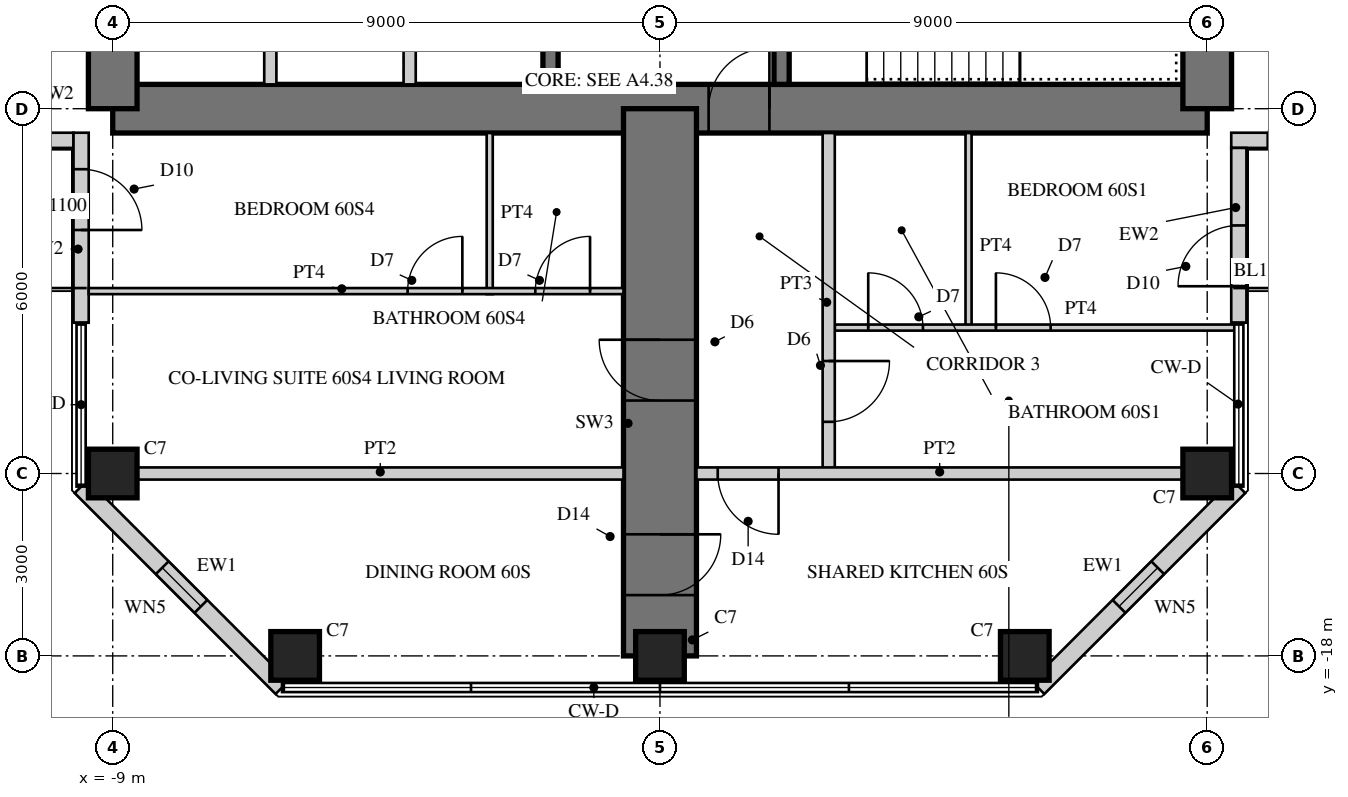
"""IFC4 building model, lengths in metres.
Left out: names, types, materials, properties, quantities, classifications, styles, units other than length and angle.
Written with IfcOpenShell. Run it as: python <this file> out.ifc"""

import sys

from ifc_helpers import new_model, si_unit, direction, frame, frame_2d, origin, origin_2d, place, context, subcontext, project, spatial, rectangle, hollow_rectangle, extrude, element, fill, save


model = new_model("IFC4")
c1 = context("Model", 3, precision=1e-05, world=origin(), true_north=direction((0.0, 1.0)))
c2 = subcontext(c1, "Body", "Model", "MODEL_VIEW")
j1 = project(units=[si_unit("LENGTHUNIT", "METRE"), si_unit("PLANEANGLEUNIT", "RADIAN")], contexts=[c1])
p1 = place(None, origin())
s1 = spatial("IfcSite", under=j1, at=p1, CompositionType="ELEMENT")
p2 = place(p1, origin())
s2 = spatial("IfcBuilding", under=s1, at=p2, CompositionType="ELEMENT")
p3 = place(p2, frame((0.0, 0.0, 235.7)))
s3 = spatial("IfcBuildingStorey", under=s2, at=p3, CompositionType="ELEMENT", Elevation=235.7)
p4 = place(p3, frame((-9.0, -9.0, 0.0), z_axis=(0.0, 0.0, 1.0), x_axis=(1.0, 0.0, 0.0)))
e1 = element("IfcWall", 1, at=p4, inside=s3, PredefinedType="SHEAR", context=c2, shape_type="SweptSolid", body=[
    extrude(rectangle(XDim=18.0, YDim=0.8, at=frame_2d((9.0, 0.0))), origin(), (0.0, 0.0, 1.0), 3.4),
])
p5 = place(p4, frame((9.8, 0.0, 0.0)))
e2 = element("IfcOpeningElement", 2, at=p5, cuts=e1, PredefinedType="OPENING", context=c2, shape_type="SweptSolid", body=[
    extrude(rectangle(XDim=1.0, YDim=2.4, at=frame_2d((0.5, 1.2))), frame((0.0, 0.41, 0.0), z_axis=(0.0, -1.0, 0.0), x_axis=(1.0, 0.0, 0.0)), (0.0, 0.0, 1.0), 0.82),
])
p6 = place(p3, frame((9.0, -9.0, 0.0), z_axis=(0.0, 0.0, 1.0), x_axis=(0.0, 1.0, 0.0)))
e3 = element("IfcWall", 3, at=p6, inside=s3, PredefinedType="SHEAR", context=c2, shape_type="SweptSolid", body=[
    extrude(rectangle(XDim=18.0, YDim=0.8, at=frame_2d((9.0, 0.0))), origin(), (0.0, 0.0, 1.0), 3.4),
])
p7 = place(p6, frame((9.8, 0.0, 0.0)))
e4 = element("IfcOpeningElement", 4, at=p7, cuts=e3, PredefinedType="OPENING", context=c2, shape_type="SweptSolid", body=[
    extrude(rectangle(XDim=1.0, YDim=2.4, at=frame_2d((0.5, 1.2))), frame((0.0, 0.41, 0.0), z_axis=(0.0, -1.0, 0.0), x_axis=(1.0, 0.0, 0.0)), (0.0, 0.0, 1.0), 0.82),
])
p8 = place(p3, frame((-9.0, 9.0, 0.0), z_axis=(0.0, 0.0, 1.0), x_axis=(0.0, -1.0, 0.0)))
e5 = element("IfcWall", 5, at=p8, inside=s3, PredefinedType="SHEAR", context=c2, shape_type="SweptSolid", body=[
    extrude(rectangle(XDim=18.0, YDim=0.8, at=frame_2d((9.0, 0.0))), origin(), (0.0, 0.0, 1.0), 3.4),
])
p9 = place(p8, frame((9.8, 0.0, 0.0)))
e6 = element("IfcOpeningElement", 6, at=p9, cuts=e5, PredefinedType="OPENING", context=c2, shape_type="SweptSolid", body=[
    extrude(rectangle(XDim=1.0, YDim=2.4, at=frame_2d((0.5, 1.2))), frame((0.0, 0.41, 0.0), z_axis=(0.0, -1.0, 0.0), x_axis=(1.0, 0.0, 0.0)), (0.0, 0.0, 1.0), 0.82),
])
p10 = place(p3, frame((-1.8, -1.875, 0.0), z_axis=(0.0, 0.0, 1.0), x_axis=(0.0, -1.0, 0.0)))
e7 = element("IfcWall", 7, at=p10, inside=s3, PredefinedType="SHEAR", context=c2, shape_type="SweptSolid", body=[
    extrude(rectangle(XDim=6.725, YDim=0.25, at=frame_2d((3.363, 0.0))), origin(), (0.0, 0.0, 1.0), 3.4),
])
p11 = place(p10, frame((1.875, 0.0, 0.0)))
e8 = element("IfcOpeningElement", 8, at=p11, cuts=e7, PredefinedType="OPENING", context=c2, shape_type="SweptSolid", body=[
    extrude(rectangle(XDim=1.6, YDim=2.4, at=frame_2d((0.8, 1.2))), frame((0.0, 0.135, 0.0), z_axis=(0.0, -1.0, 0.0), x_axis=(1.0, 0.0, 0.0)), (0.0, 0.0, 1.0), 0.27),
])
for number, where, z_axis, x_axis in (
    (9, (-4.117, -5.975, 0.0), (0.0, 0.0, 1.0), (0.0, -1.0, 0.0)),
    (10, (-6.408, -5.975, 0.0), (0.0, 0.0, 1.0), (0.0, -1.0, 0.0)),
):
    element("IfcWall", number, at=place(p3, frame(where, z_axis=z_axis, x_axis=x_axis)), inside=s3, PredefinedType="PARTITIONING", context=c2, shape_type="SweptSolid", body=[
        extrude(rectangle(XDim=2.625, YDim=0.2, at=frame_2d((1.312, 0.0))), origin(), (0.0, 0.0, 1.0), 3.4),
    ])
p12 = place(p3, frame((2.0, -1.675, 0.0), z_axis=(0.0, 0.0, 1.0), x_axis=(0.0, -1.0, 0.0)))
e11 = element("IfcWall", 11, at=p12, inside=s3, PredefinedType="SHEAR", context=c2, shape_type="SweptSolid", body=[
    extrude(rectangle(XDim=6.925, YDim=0.25, at=frame_2d((3.462, 0.0))), origin(), (0.0, 0.0, 1.0), 3.4),
])
p13 = place(p12, frame((0.725, 0.0, 0.0)))
e12 = element("IfcOpeningElement", 12, at=p13, cuts=e11, PredefinedType="OPENING", context=c2, shape_type="SweptSolid", body=[
    extrude(rectangle(XDim=1.0, YDim=2.1, at=frame_2d((0.5, 1.05))), frame((0.0, 0.135, 0.0), z_axis=(0.0, -1.0, 0.0), x_axis=(1.0, 0.0, 0.0)), (0.0, 0.0, 1.0), 0.27),
])
p14 = place(p3, frame((0.0, -9.0, 0.0), z_axis=(0.0, 0.0, 1.0), x_axis=(0.0, -1.0, 0.0)))
e13 = element("IfcWall", 13, at=p14, inside=s3, PredefinedType="SHEAR", context=c2, shape_type="SweptSolid", body=[
    extrude(rectangle(XDim=9.0, YDim=1.2, at=frame_2d((4.5, 0.0))), origin(), (0.0, 0.0, 1.0), 3.4),
])
p15 = place(p14, frame((3.8, 0.0, 0.0)))
e14 = element("IfcOpeningElement", 14, at=p15, cuts=e13, PredefinedType="OPENING", context=c2, shape_type="SweptSolid", body=[
    extrude(rectangle(XDim=1.0, YDim=2.15, at=frame_2d((0.5, 1.075))), frame((0.0, 0.61, 0.0), z_axis=(0.0, -1.0, 0.0), x_axis=(1.0, 0.0, 0.0)), (0.0, 0.0, 1.0), 1.22),
])
p16 = place(p14, frame((7.0, 0.0, 0.0)))
e15 = element("IfcOpeningElement", 15, at=p16, cuts=e13, PredefinedType="OPENING", context=c2, shape_type="SweptSolid", body=[
    extrude(rectangle(XDim=1.0, YDim=2.2, at=frame_2d((0.5, 1.1))), frame((0.0, 0.61, 0.0), z_axis=(0.0, -1.0, 0.0), x_axis=(1.0, 0.0, 0.0)), (0.0, 0.0, 1.0), 1.22),
])
for number, where, z_axis, x_axis in (
    (16, (-9.0, -15.0, 0.0), (0.0, 0.0, 1.0), (1.0, 0.0, 0.0)),
    (17, (9.0, -15.0, 0.0), (0.0, 0.0, 1.0), (1.0, 0.0, 0.0)),
    (18, (-6.0, -18.0, 0.0), (0.0, 0.0, 1.0), (1.0, 0.0, 0.0)),
    (19, (0.0, -18.0, 0.0), (0.0, 0.0, 1.0), (1.0, 0.0, 0.0)),
    (20, (6.0, -18.0, 0.0), (0.0, 0.0, 1.0), (1.0, 0.0, 0.0)),
):
    element("IfcColumn", number, at=place(p3, frame(where, z_axis=z_axis, x_axis=x_axis)), inside=s3, PredefinedType="COLUMN", context=c2, shape_type="SweptSolid", body=[
        extrude(rectangle(XDim=0.8, YDim=0.8, at=origin_2d()), origin(), (0.0, 0.0, 1.0), 3.4),
    ])
p17 = place(p3, frame((9.395, -9.52, 0.0), z_axis=(0.0, 0.0, 1.0), x_axis=(1.0, 0.0, 0.0)))
e21 = element("IfcWall", 21, at=p17, inside=s3, PredefinedType="SOLIDWALL", context=c2, shape_type="SweptSolid", body=[
    extrude(rectangle(XDim=3.125, YDim=0.25, at=frame_2d((1.562, 0.0))), origin(), (0.0, 0.0, 1.0), 3.22),
])
p18 = place(p17, frame((0.6, 0.0, 0.0)))
e22 = element("IfcOpeningElement", 22, at=p18, cuts=e21, PredefinedType="OPENING", context=c2, shape_type="SweptSolid", body=[
    extrude(rectangle(XDim=1.0, YDim=2.2, at=frame_2d((0.5, 1.1))), frame((0.0, 0.135, 0.0), z_axis=(0.0, -1.0, 0.0), x_axis=(1.0, 0.0, 0.0)), (0.0, 0.0, 1.0), 0.27),
])
p19 = place(p3, frame((-12.52, -9.52, 0.0), z_axis=(0.0, 0.0, 1.0), x_axis=(1.0, 0.0, 0.0)))
e23 = element("IfcWall", 23, at=p19, inside=s3, PredefinedType="SOLIDWALL", context=c2, shape_type="SweptSolid", body=[
    extrude(rectangle(XDim=2.875, YDim=0.25, at=frame_2d((1.438, 0.0))), origin(), (0.0, 0.0, 1.0), 3.22),
])
p20 = place(p19, frame((0.6, 0.0, 0.0)))
e24 = element("IfcOpeningElement", 24, at=p20, cuts=e23, PredefinedType="OPENING", context=c2, shape_type="SweptSolid", body=[
    extrude(rectangle(XDim=1.0, YDim=2.2, at=frame_2d((0.5, 1.1))), frame((0.0, 0.135, 0.0), z_axis=(0.0, -1.0, 0.0), x_axis=(1.0, 0.0, 0.0)), (0.0, 0.0, 1.0), 0.27),
])
p21 = place(p3, frame((-9.52, -9.395, 0.0), z_axis=(0.0, 0.0, 1.0), x_axis=(0.0, -1.0, 0.0)))
e25 = element("IfcWall", 25, at=p21, inside=s3, PredefinedType="SOLIDWALL", context=c2, shape_type="SweptSolid", body=[
    extrude(rectangle(XDim=3.125, YDim=0.25, at=frame_2d((1.562, 0.0))), origin(), (0.0, 0.0, 1.0), 3.22),
])
p22 = place(p21, frame((0.6, 0.0, 0.0)))
e26 = element("IfcOpeningElement", 26, at=p22, cuts=e25, PredefinedType="OPENING", context=c2, shape_type="SweptSolid", body=[
    extrude(rectangle(XDim=1.0, YDim=2.2, at=frame_2d((0.5, 1.1))), frame((0.0, 0.135, 0.0), z_axis=(0.0, -1.0, 0.0), x_axis=(1.0, 0.0, 0.0)), (0.0, 0.0, 1.0), 0.27),
])
p23 = place(p3, frame((-9.52, -15.215, 0.0), z_axis=(0.0, 0.0, 1.0), x_axis=(0.707106781187, -0.707106781187, 0.0)))
e27 = element("IfcWall", 27, at=p23, inside=s3, PredefinedType="SOLIDWALL", context=c2, shape_type="SweptSolid", body=[
    extrude(rectangle(XDim=4.674, YDim=0.3, at=frame_2d((2.337, 0.0))), origin(), (0.0, 0.0, 1.0), 3.22),
])
p24 = place(p23, frame((1.887, 0.0, 0.3)))
e28 = element("IfcOpeningElement", 28, at=p24, cuts=e27, PredefinedType="OPENING", context=c2, shape_type="SweptSolid", body=[
    extrude(rectangle(XDim=0.9, YDim=2.4, at=frame_2d((0.45, 1.2))), frame((0.0, 0.16, 0.0), z_axis=(0.0, -1.0, 0.0), x_axis=(1.0, 0.0, 0.0)), (0.0, 0.0, 1.0), 0.32),
])
p25 = place(p3, frame((6.215, -18.52, 0.0), z_axis=(0.0, 0.0, 1.0), x_axis=(0.707106781187, 0.707106781187, 0.0)))
e29 = element("IfcWall", 29, at=p25, inside=s3, PredefinedType="SOLIDWALL", context=c2, shape_type="SweptSolid", body=[
    extrude(rectangle(XDim=4.674, YDim=0.3, at=frame_2d((2.337, 0.0))), origin(), (0.0, 0.0, 1.0), 3.22),
])
p26 = place(p25, frame((1.887, 0.0, 0.3)))
e30 = element("IfcOpeningElement", 30, at=p26, cuts=e29, PredefinedType="OPENING", context=c2, shape_type="SweptSolid", body=[
    extrude(rectangle(XDim=0.9, YDim=2.4, at=frame_2d((0.45, 1.2))), frame((0.0, 0.16, 0.0), z_axis=(0.0, -1.0, 0.0), x_axis=(1.0, 0.0, 0.0)), (0.0, 0.0, 1.0), 0.32),
])
p27 = place(p3, frame((9.52, -12.52, 0.0), z_axis=(0.0, 0.0, 1.0), x_axis=(0.0, 1.0, 0.0)))
e31 = element("IfcWall", 31, at=p27, inside=s3, PredefinedType="SOLIDWALL", context=c2, shape_type="SweptSolid", body=[
    extrude(rectangle(XDim=2.875, YDim=0.25, at=frame_2d((1.438, 0.0))), origin(), (0.0, 0.0, 1.0), 3.22),
])
p28 = place(p27, frame((0.6, 0.0, 0.0)))
e32 = element("IfcOpeningElement", 32, at=p28, cuts=e31, PredefinedType="OPENING", context=c2, shape_type="SweptSolid", body=[
    extrude(rectangle(XDim=1.0, YDim=2.2, at=frame_2d((0.5, 1.1))), frame((0.0, 0.135, 0.0), z_axis=(0.0, -1.0, 0.0), x_axis=(1.0, 0.0, 0.0)), (0.0, 0.0, 1.0), 0.27),
])
p29 = place(p3, frame((5.075, -9.4, 0.0), z_axis=(0.0, 0.0, 1.0), x_axis=(0.0, -1.0, 0.0)))
e33 = element("IfcWall", 33, at=p29, inside=s3, PredefinedType="PARTITIONING", context=c2, shape_type="SweptSolid", body=[
    extrude(rectangle(XDim=3.25, YDim=0.1, at=frame_2d((1.625, 0.0))), origin(), (0.0, 0.0, 1.0), 3.22),
])
p30 = place(p3, frame((2.875, -12.6, 0.0), z_axis=(0.0, 0.0, 1.0), x_axis=(1.0, 0.0, 0.0)))
e34 = element("IfcWall", 34, at=p30, inside=s3, PredefinedType="PARTITIONING", context=c2, shape_type="SweptSolid", body=[
    extrude(rectangle(XDim=6.605, YDim=0.1, at=frame_2d((3.302, 0.0))), origin(), (0.0, 0.0, 1.0), 3.22),
])
p31 = place(p30, frame((0.55, 0.0, 0.0)))
e35 = element("IfcOpeningElement", 35, at=p31, cuts=e34, PredefinedType="OPENING", context=c2, shape_type="SweptSolid", body=[
    extrude(rectangle(XDim=0.9, YDim=2.1, at=frame_2d((0.45, 1.05))), frame((0.0, 0.06, 0.0), z_axis=(0.0, -1.0, 0.0), x_axis=(1.0, 0.0, 0.0)), (0.0, 0.0, 1.0), 0.12),
])
p32 = place(p30, frame((2.65, 0.0, 0.0)))
e36 = element("IfcOpeningElement", 36, at=p32, cuts=e34, PredefinedType="OPENING", context=c2, shape_type="SweptSolid", body=[
    extrude(rectangle(XDim=0.9, YDim=2.1, at=frame_2d((0.45, 1.05))), frame((0.0, 0.06, 0.0), z_axis=(0.0, -1.0, 0.0), x_axis=(1.0, 0.0, 0.0)), (0.0, 0.0, 1.0), 0.12),
])
p33 = place(p3, frame((-2.8, -9.4, 0.0), z_axis=(0.0, 0.0, 1.0), x_axis=(0.0, -1.0, 0.0)))
e37 = element("IfcWall", 37, at=p33, inside=s3, PredefinedType="PARTITIONING", context=c2, shape_type="SweptSolid", body=[
    extrude(rectangle(XDim=2.65, YDim=0.1, at=frame_2d((1.325, 0.0))), origin(), (0.0, 0.0, 1.0), 3.22),
])
p34 = place(p3, frame((-9.395, -12.0, 0.0), z_axis=(0.0, 0.0, 1.0), x_axis=(1.0, 0.0, 0.0)))
e38 = element("IfcWall", 38, at=p34, inside=s3, PredefinedType="PARTITIONING", context=c2, shape_type="SweptSolid", body=[
    extrude(rectangle(XDim=8.795, YDim=0.1, at=frame_2d((4.397, 0.0))), origin(), (0.0, 0.0, 1.0), 3.22),
])
p35 = place(p34, frame((5.245, 0.0, 0.0)))
e39 = element("IfcOpeningElement", 39, at=p35, cuts=e38, PredefinedType="OPENING", context=c2, shape_type="SweptSolid", body=[
    extrude(rectangle(XDim=0.9, YDim=2.1, at=frame_2d((0.45, 1.05))), frame((0.0, 0.06, 0.0), z_axis=(0.0, -1.0, 0.0), x_axis=(1.0, 0.0, 0.0)), (0.0, 0.0, 1.0), 0.12),
])
p36 = place(p34, frame((7.345, 0.0, 0.0)))
e40 = element("IfcOpeningElement", 40, at=p36, cuts=e38, PredefinedType="OPENING", context=c2, shape_type="SweptSolid", body=[
    extrude(rectangle(XDim=0.9, YDim=2.1, at=frame_2d((0.45, 1.05))), frame((0.0, 0.06, 0.0), z_axis=(0.0, -1.0, 0.0), x_axis=(1.0, 0.0, 0.0)), (0.0, 0.0, 1.0), 0.12),
])
p37 = place(p3, frame((2.775, -9.4, 0.0), z_axis=(0.0, 0.0, 1.0), x_axis=(0.0, -1.0, 0.0)))
e41 = element("IfcWall", 41, at=p37, inside=s3, PredefinedType="SOLIDWALL", context=c2, shape_type="SweptSolid", body=[
    extrude(rectangle(XDim=5.6, YDim=0.2, at=frame_2d((2.8, 0.0))), origin(), (0.0, 0.0, 1.0), 3.22),
])
p38 = place(p37, frame((3.75, 0.0, 0.0)))
e42 = element("IfcOpeningElement", 42, at=p38, cuts=e41, PredefinedType="OPENING", context=c2, shape_type="SweptSolid", body=[
    extrude(rectangle(XDim=1.0, YDim=2.15, at=frame_2d((0.5, 1.075))), frame((0.0, 0.11, 0.0), z_axis=(0.0, -1.0, 0.0), x_axis=(1.0, 0.0, 0.0)), (0.0, 0.0, 1.0), 0.22),
])
p39 = place(p3, frame((-8.6, -15.0, 0.0), z_axis=(0.0, 0.0, 1.0), x_axis=(1.0, 0.0, 0.0)))
e43 = element("IfcWall", 43, at=p39, inside=s3, PredefinedType="SOLIDWALL", context=c2, shape_type="SweptSolid", body=[
    extrude(rectangle(XDim=8.0, YDim=0.2, at=frame_2d((4.0, 0.0))), origin(), (0.0, 0.0, 1.0), 2.52),
])
p40 = place(p3, frame((0.6, -15.0, 0.0), z_axis=(0.0, 0.0, 1.0), x_axis=(1.0, 0.0, 0.0)))
e44 = element("IfcWall", 44, at=p40, inside=s3, PredefinedType="SOLIDWALL", context=c2, shape_type="SweptSolid", body=[
    extrude(rectangle(XDim=8.0, YDim=0.2, at=frame_2d((4.0, 0.0))), origin(), (0.0, 0.0, 1.0), 2.52),
])
p41 = place(p40, frame((0.35, 0.0, 0.0)))
e45 = element("IfcOpeningElement", 45, at=p41, cuts=e44, PredefinedType="OPENING", context=c2, shape_type="SweptSolid", body=[
    extrude(rectangle(XDim=1.0, YDim=2.2, at=frame_2d((0.5, 1.1))), frame((0.0, 0.11, 0.0), z_axis=(0.0, -1.0, 0.0), x_axis=(1.0, 0.0, 0.0)), (0.0, 0.0, 1.0), 0.22),
])
p42 = place(p18, origin())
e46 = element("IfcDoor", 46, at=p42, inside=s3, OperationType="SINGLE_SWING_RIGHT", PredefinedType="DOOR", context=c2, shape_type="SweptSolid", body=[
    extrude(hollow_rectangle(XDim=1.0, YDim=2.2, WallThickness=0.06, at=frame_2d((0.5, 1.1))), frame((0.0, 0.025, 0.0), z_axis=(0.0, -1.0, 0.0), x_axis=(1.0, 0.0, 0.0)), (0.0, 0.0, 1.0), 0.05),
    extrude(rectangle(XDim=0.879, YDim=2.079, at=frame_2d((0.5, 1.1))), frame((0.0, 0.025, 0.0), z_axis=(0.0, -1.0, 0.0), x_axis=(1.0, 0.0, 0.0)), (0.0, 0.0, 1.0), 0.05),
])
fill(e22, e46)
p43 = place(p22, origin())
e47 = element("IfcDoor", 47, at=p43, inside=s3, OperationType="SINGLE_SWING_RIGHT", PredefinedType="DOOR", context=c2, shape_type="SweptSolid", body=[
    extrude(hollow_rectangle(XDim=1.0, YDim=2.2, WallThickness=0.06, at=frame_2d((0.5, 1.1))), frame((0.0, 0.025, 0.0), z_axis=(0.0, -1.0, 0.0), x_axis=(1.0, 0.0, 0.0)), (0.0, 0.0, 1.0), 0.05),
    extrude(rectangle(XDim=0.879, YDim=2.079, at=frame_2d((0.5, 1.1))), frame((0.0, 0.025, 0.0), z_axis=(0.0, -1.0, 0.0), x_axis=(1.0, 0.0, 0.0)), (0.0, 0.0, 1.0), 0.05),
])
fill(e26, e47)
p44 = place(p24, origin())
e48 = element("IfcWindow", 48, at=p44, inside=s3, PartitioningType="SINGLE_PANEL", PredefinedType="WINDOW", context=c2, shape_type="SweptSolid", body=[
    extrude(hollow_rectangle(XDim=0.9, YDim=2.4, WallThickness=0.06, at=frame_2d((0.45, 1.2))), frame((0.0, 0.03, 0.0), z_axis=(0.0, -1.0, 0.0), x_axis=(1.0, 0.0, 0.0)), (0.0, 0.0, 1.0), 0.06),
    extrude(rectangle(XDim=0.779, YDim=2.279, at=frame_2d((0.45, 1.2))), frame((0.0, 0.03, 0.0), z_axis=(0.0, -1.0, 0.0), x_axis=(1.0, 0.0, 0.0)), (0.0, 0.0, 1.0), 0.06),
])
fill(e28, e48)
p45 = place(p26, origin())
e49 = element("IfcWindow", 49, at=p45, inside=s3, PartitioningType="SINGLE_PANEL", PredefinedType="WINDOW", context=c2, shape_type="SweptSolid", body=[
    extrude(hollow_rectangle(XDim=0.9, YDim=2.4, WallThickness=0.06, at=frame_2d((0.45, 1.2))), frame((0.0, 0.03, 0.0), z_axis=(0.0, -1.0, 0.0), x_axis=(1.0, 0.0, 0.0)), (0.0, 0.0, 1.0), 0.06),
    extrude(rectangle(XDim=0.779, YDim=2.279, at=frame_2d((0.45, 1.2))), frame((0.0, 0.03, 0.0), z_axis=(0.0, -1.0, 0.0), x_axis=(1.0, 0.0, 0.0)), (0.0, 0.0, 1.0), 0.06),
])
fill(e30, e49)
p46 = place(p28, origin())
e50 = element("IfcDoor", 50, at=p46, inside=s3, OperationType="SINGLE_SWING_LEFT", PredefinedType="DOOR", context=c2, shape_type="SweptSolid", body=[
    extrude(hollow_rectangle(XDim=1.0, YDim=2.2, WallThickness=0.06, at=frame_2d((0.5, 1.1))), frame((0.0, 0.025, 0.0), z_axis=(0.0, -1.0, 0.0), x_axis=(1.0, 0.0, 0.0)), (0.0, 0.0, 1.0), 0.05),
    extrude(rectangle(XDim=0.879, YDim=2.079, at=frame_2d((0.5, 1.1))), frame((0.0, 0.025, 0.0), z_axis=(0.0, -1.0, 0.0), x_axis=(1.0, 0.0, 0.0)), (0.0, 0.0, 1.0), 0.05),
])
fill(e32, e50)
p47 = place(p31, origin())
e51 = element("IfcDoor", 51, at=p47, inside=s3, OperationType="SINGLE_SWING_LEFT", PredefinedType="DOOR", context=c2, shape_type="SweptSolid", body=[
    extrude(rectangle(XDim=0.9, YDim=2.1, at=frame_2d((0.45, 1.05))), frame((0.0, 0.025, 0.0), z_axis=(0.0, -1.0, 0.0), x_axis=(1.0, 0.0, 0.0)), (0.0, 0.0, 1.0), 0.05),
])
fill(e35, e51)
p48 = place(p32, origin())
e52 = element("IfcDoor", 52, at=p48, inside=s3, OperationType="SINGLE_SWING_LEFT", PredefinedType="DOOR", context=c2, shape_type="SweptSolid", body=[
    extrude(rectangle(XDim=0.9, YDim=2.1, at=frame_2d((0.45, 1.05))), frame((0.0, 0.025, 0.0), z_axis=(0.0, -1.0, 0.0), x_axis=(1.0, 0.0, 0.0)), (0.0, 0.0, 1.0), 0.05),
])
fill(e36, e52)
p49 = place(p35, origin())
e53 = element("IfcDoor", 53, at=p49, inside=s3, OperationType="SINGLE_SWING_RIGHT", PredefinedType="DOOR", context=c2, shape_type="SweptSolid", body=[
    extrude(rectangle(XDim=0.9, YDim=2.1, at=frame_2d((0.45, 1.05))), frame((0.0, 0.025, 0.0), z_axis=(0.0, -1.0, 0.0), x_axis=(1.0, 0.0, 0.0)), (0.0, 0.0, 1.0), 0.05),
])
fill(e39, e53)
p50 = place(p36, origin())
e54 = element("IfcDoor", 54, at=p50, inside=s3, OperationType="SINGLE_SWING_RIGHT", PredefinedType="DOOR", context=c2, shape_type="SweptSolid", body=[
    extrude(rectangle(XDim=0.9, YDim=2.1, at=frame_2d((0.45, 1.05))), frame((0.0, 0.025, 0.0), z_axis=(0.0, -1.0, 0.0), x_axis=(1.0, 0.0, 0.0)), (0.0, 0.0, 1.0), 0.05),
])
fill(e40, e54)
p51 = place(p38, origin())
e55 = element("IfcDoor", 55, at=p51, inside=s3, OperationType="SINGLE_SWING_LEFT", PredefinedType="DOOR", context=c2, shape_type="SweptSolid", body=[
    extrude(rectangle(XDim=1.0, YDim=2.15, at=frame_2d((0.5, 1.075))), frame((0.0, 0.025, 0.0), z_axis=(0.0, -1.0, 0.0), x_axis=(1.0, 0.0, 0.0)), (0.0, 0.0, 1.0), 0.05),
])
fill(e42, e55)
p52 = place(p41, frame((1.0, 0.0, 0.0), z_axis=(0.0, 0.0, 1.0), x_axis=(-1.0, 0.0, 0.0)))
e56 = element("IfcDoor", 56, at=p52, inside=s3, OperationType="SINGLE_SWING_LEFT", PredefinedType="DOOR", context=c2, shape_type="SweptSolid", body=[
    extrude(rectangle(XDim=1.0, YDim=2.2, at=frame_2d((0.5, 1.1))), frame((0.0, 0.025, 0.0), z_axis=(0.0, -1.0, 0.0), x_axis=(1.0, 0.0, 0.0)), (0.0, 0.0, 1.0), 0.05),
])
fill(e45, e56)
p53 = place(p15, frame((1.0, 0.0, 0.0), z_axis=(0.0, 0.0, 1.0), x_axis=(-1.0, 0.0, 0.0)))
e57 = element("IfcDoor", 57, at=p53, inside=s3, OperationType="SINGLE_SWING_RIGHT", PredefinedType="DOOR", context=c2, shape_type="SweptSolid", body=[
    extrude(rectangle(XDim=1.0, YDim=2.15, at=frame_2d((0.5, 1.075))), frame((0.0, 0.025, 0.0), z_axis=(0.0, -1.0, 0.0), x_axis=(1.0, 0.0, 0.0)), (0.0, 0.0, 1.0), 0.05),
])
fill(e14, e57)
p54 = place(p16, origin())
e58 = element("IfcDoor", 58, at=p54, inside=s3, OperationType="SINGLE_SWING_LEFT", PredefinedType="DOOR", context=c2, shape_type="SweptSolid", body=[
    extrude(rectangle(XDim=1.0, YDim=2.2, at=frame_2d((0.5, 1.1))), frame((0.0, 0.025, 0.0), z_axis=(0.0, -1.0, 0.0), x_axis=(1.0, 0.0, 0.0)), (0.0, 0.0, 1.0), 0.05),
])
fill(e15, e58)
p55 = place(p5, origin())
e59 = element("IfcDoor", 59, at=p55, inside=s3, OperationType="SINGLE_SWING_RIGHT", PredefinedType="DOOR", context=c2, shape_type="SweptSolid", body=[
    extrude(rectangle(XDim=1.0, YDim=2.4, at=frame_2d((0.5, 1.2))), frame((0.0, 0.055, 0.0), z_axis=(0.0, -1.0, 0.0), x_axis=(1.0, 0.0, 0.0)), (0.0, 0.0, 1.0), 0.05),
])
fill(e2, e59)
save(model, sys.argv[1])
